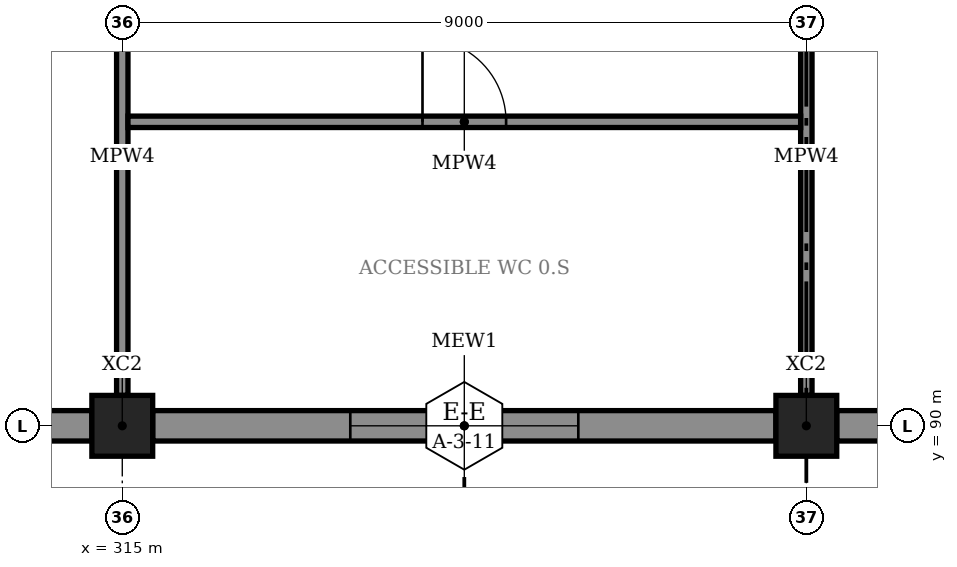
"""IFC4 building model, lengths in metres.
Left out: names, types, materials, properties, quantities, classifications, styles, units other than length and angle.
Written with IfcOpenShell. Run it as: python <this file> out.ifc"""

import sys

from ifc_helpers import new_model, si_unit, direction, frame, frame_2d, origin, origin_2d, place, context, subcontext, project, spatial, rectangle, extrude, element, fill, save


model = new_model("IFC4")
c1 = context("Model", 3, precision=1e-05, world=origin(), true_north=direction((0.0, 1.0)))
c2 = subcontext(c1, "Body", "Model", "MODEL_VIEW")
j1 = project(units=[si_unit("LENGTHUNIT", "METRE"), si_unit("PLANEANGLEUNIT", "RADIAN")], contexts=[c1])
p1 = place(None, origin())
s1 = spatial("IfcSite", under=j1, at=p1, CompositionType="ELEMENT")
p2 = place(p1, origin())
s2 = spatial("IfcBuilding", under=s1, at=p2, CompositionType="ELEMENT")
p3 = place(p2, origin())
s3 = spatial("IfcBuildingStorey", under=s2, at=p3, CompositionType="ELEMENT", Elevation=0.0)
for number, where, z_axis, x_axis in (
    (1, (315.0, 90.0, -0.3), (0.0, 0.0, 1.0), (1.0, 0.0, 0.0)),
    (2, (324.0, 90.0, -0.3), (0.0, 0.0, 1.0), (1.0, 0.0, 0.0)),
):
    element("IfcColumn", number, at=place(p3, frame(where, z_axis=z_axis, x_axis=x_axis)), inside=s3, PredefinedType="COLUMN", context=c2, shape_type="SweptSolid", body=[
        extrude(rectangle(XDim=0.8, YDim=0.8, at=origin_2d()), origin(), (0.0, 0.0, 1.0), 6.3),
    ])
p4 = place(p3, frame((306.4, 90.0, 0.0), z_axis=(0.0, 0.0, 1.0), x_axis=(1.0, 0.0, 0.0)))
e3 = element("IfcWall", 3, at=p4, inside=s3, PredefinedType="STANDARD", context=c2, shape_type="SweptSolid", body=[
    extrude(rectangle(XDim=8.2, YDim=0.4, at=frame_2d((4.1, 0.0))), origin(), (0.0, 0.0, 1.0), 4.82),
])
p5 = place(p4, frame((2.6, 0.0, 0.9)))
e4 = element("IfcOpeningElement", 4, at=p5, cuts=e3, PredefinedType="OPENING", context=c2, shape_type="SweptSolid", body=[
    extrude(rectangle(XDim=3.0, YDim=2.1, at=frame_2d((1.5, 1.05))), frame((0.0, 0.21, 0.0), z_axis=(0.0, -1.0, 0.0), x_axis=(1.0, 0.0, 0.0)), (0.0, 0.0, 1.0), 0.42),
])
p6 = place(p3, frame((315.4, 90.0, 0.0), z_axis=(0.0, 0.0, 1.0), x_axis=(1.0, 0.0, 0.0)))
e5 = element("IfcWall", 5, at=p6, inside=s3, PredefinedType="STANDARD", context=c2, shape_type="SweptSolid", body=[
    extrude(rectangle(XDim=8.2, YDim=0.4, at=frame_2d((4.1, 0.0))), origin(), (0.0, 0.0, 1.0), 4.82),
])
p7 = place(p6, frame((2.6, 0.0, 0.9)))
e6 = element("IfcOpeningElement", 6, at=p7, cuts=e5, PredefinedType="OPENING", context=c2, shape_type="SweptSolid", body=[
    extrude(rectangle(XDim=3.0, YDim=2.1, at=frame_2d((1.5, 1.05))), frame((0.0, 0.21, 0.0), z_axis=(0.0, -1.0, 0.0), x_axis=(1.0, 0.0, 0.0)), (0.0, 0.0, 1.0), 0.42),
])
p8 = place(p3, frame((324.4, 90.0, 0.0), z_axis=(0.0, 0.0, 1.0), x_axis=(1.0, 0.0, 0.0)))
e7 = element("IfcWall", 7, at=p8, inside=s3, PredefinedType="STANDARD", context=c2, shape_type="SweptSolid", body=[
    extrude(rectangle(XDim=8.2, YDim=0.4, at=frame_2d((4.1, 0.0))), origin(), (0.0, 0.0, 1.0), 4.82),
])
p9 = place(p8, frame((2.6, 0.0, 0.9)))
e8 = element("IfcOpeningElement", 8, at=p9, cuts=e7, PredefinedType="OPENING", context=c2, shape_type="SweptSolid", body=[
    extrude(rectangle(XDim=3.0, YDim=2.1, at=frame_2d((1.5, 1.05))), frame((0.0, 0.21, 0.0), z_axis=(0.0, -1.0, 0.0), x_axis=(1.0, 0.0, 0.0)), (0.0, 0.0, 1.0), 0.42),
])
p10 = place(p3, frame((315.0, 90.4, 0.0), z_axis=(0.0, 0.0, 1.0), x_axis=(0.0, 1.0, 0.0)))
e9 = element("IfcWall", 9, at=p10, inside=s3, PredefinedType="PARTITIONING", context=c2, shape_type="SweptSolid", body=[
    extrude(rectangle(XDim=6.275, YDim=0.15, at=frame_2d((3.138, 0.0))), origin(), (0.0, 0.0, 1.0), 4.82),
])
p11 = place(p10, frame((4.55, 0.0, 0.0)))
e10 = element("IfcOpeningElement", 10, at=p11, cuts=e9, PredefinedType="OPENING", context=c2, shape_type="SweptSolid", body=[
    extrude(rectangle(XDim=0.9, YDim=2.1, at=frame_2d((0.45, 1.05))), frame((0.0, 0.085, 0.0), z_axis=(0.0, -1.0, 0.0), x_axis=(1.0, 0.0, 0.0)), (0.0, 0.0, 1.0), 0.17),
])
p12 = place(p3, frame((324.0, 90.4, 0.0), z_axis=(0.0, 0.0, 1.0), x_axis=(0.0, 1.0, 0.0)))
e11 = element("IfcWall", 11, at=p12, inside=s3, PredefinedType="PARTITIONING", context=c2, shape_type="SweptSolid", body=[
    extrude(rectangle(XDim=6.275, YDim=0.15, at=frame_2d((3.138, 0.0))), origin(), (0.0, 0.0, 1.0), 4.82),
])
p13 = place(p12, frame((4.55, 0.0, 0.0)))
e12 = element("IfcOpeningElement", 12, at=p13, cuts=e11, PredefinedType="OPENING", context=c2, shape_type="SweptSolid", body=[
    extrude(rectangle(XDim=0.9, YDim=2.1, at=frame_2d((0.45, 1.05))), frame((0.0, 0.085, 0.0), z_axis=(0.0, -1.0, 0.0), x_axis=(1.0, 0.0, 0.0)), (0.0, 0.0, 1.0), 0.17),
])
p14 = place(p3, frame((315.075, 94.0, 0.0), z_axis=(0.0, 0.0, 1.0), x_axis=(1.0, 0.0, 0.0)))
e13 = element("IfcWall", 13, at=p14, inside=s3, PredefinedType="PARTITIONING", context=c2, shape_type="SweptSolid", body=[
    extrude(rectangle(XDim=8.85, YDim=0.15, at=frame_2d((4.425, 0.0))), origin(), (0.0, 0.0, 1.0), 4.82),
])
p15 = place(p14, frame((3.875, 0.0, 0.0)))
e14 = element("IfcOpeningElement", 14, at=p15, cuts=e13, PredefinedType="OPENING", context=c2, shape_type="SweptSolid", body=[
    extrude(rectangle(XDim=1.1, YDim=2.1, at=frame_2d((0.55, 1.05))), frame((0.0, 0.085, 0.0), z_axis=(0.0, -1.0, 0.0), x_axis=(1.0, 0.0, 0.0)), (0.0, 0.0, 1.0), 0.17),
])
p16 = place(p7, origin())
e15 = element("IfcWindow", 15, at=p16, inside=s3, PartitioningType="TRIPLE_PANEL_VERTICAL", PredefinedType="WINDOW", context=c2, shape_type="SweptSolid", body=[
    extrude(rectangle(XDim=3.0, YDim=2.1, at=frame_2d((1.5, 1.05))), frame((0.0, 0.03, 0.0), z_axis=(0.0, -1.0, 0.0), x_axis=(1.0, 0.0, 0.0)), (0.0, 0.0, 1.0), 0.06),
])
fill(e6, e15)
p17 = place(p15, origin())
e16 = element("IfcDoor", 16, at=p17, inside=s3, OperationType="SINGLE_SWING_LEFT", PredefinedType="DOOR", context=c2, shape_type="SweptSolid", body=[
    extrude(rectangle(XDim=1.1, YDim=2.1, at=frame_2d((0.55, 1.05))), frame((0.0, 0.025, 0.0), z_axis=(0.0, -1.0, 0.0), x_axis=(1.0, 0.0, 0.0)), (0.0, 0.0, 1.0), 0.05),
])
fill(e14, e16)
save(model, sys.argv[1])
